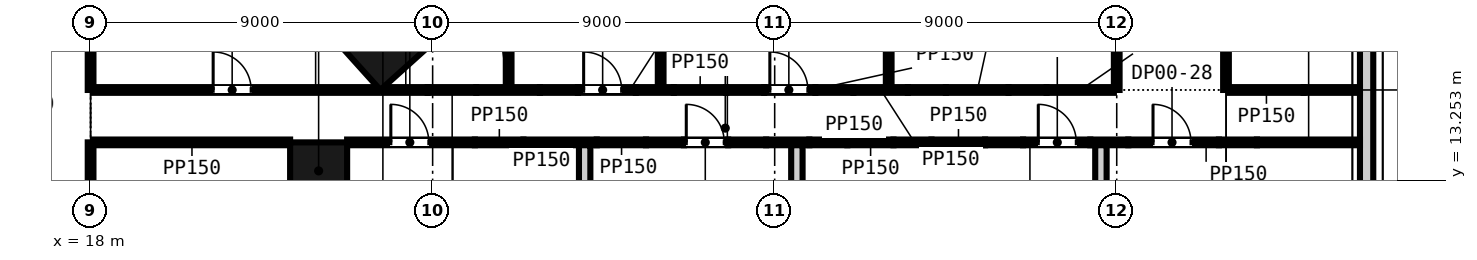
"""IFC4 building model, lengths in metres.
Left out: names, types, materials, properties, quantities, classifications, styles, units other than length and angle.
Written with IfcOpenShell. Run it as: python <this file> out.ifc"""

import sys

from ifc_helpers import new_model, si_unit, direction, frame, frame_2d, origin, origin_2d, place, context, subcontext, project, spatial, rectangle, extrude, element, fill, save


model = new_model("IFC4")
c1 = context("Model", 3, precision=1e-05, world=origin(), true_north=direction((0.0, 1.0)))
c2 = subcontext(c1, "Body", "Model", "MODEL_VIEW")
j1 = project(units=[si_unit("LENGTHUNIT", "METRE"), si_unit("PLANEANGLEUNIT", "RADIAN")], contexts=[c1])
p1 = place(None, origin())
s1 = spatial("IfcSite", under=j1, at=p1, CompositionType="ELEMENT")
p2 = place(p1, origin())
s2 = spatial("IfcBuilding", under=s1, at=p2, CompositionType="ELEMENT")
p3 = place(p2, origin())
s3 = spatial("IfcBuildingStorey", under=s2, at=p3, CompositionType="ELEMENT", Elevation=0.0)
p4 = place(p3, frame((25.691, 16.9, -0.3), z_axis=(0.0, 0.0, 1.0), x_axis=(-0.669130606359, 0.743144825477, 0.0)))
e1 = element("IfcColumn", 1, at=p4, inside=s3, PredefinedType="COLUMN", context=c2, shape_type="SweptSolid", body=[
    extrude(rectangle(XDim=1.8, YDim=1.8, at=origin_2d()), origin(), (0.0, 0.0, 1.0), 8.9),
])
p5 = place(p3, frame((24.0, 13.5, -0.3), z_axis=(0.0, 0.0, 1.0), x_axis=(1.0, 0.0, 0.0)))
e2 = element("IfcColumn", 2, at=p5, inside=s3, PredefinedType="COLUMN", context=c2, shape_type="SweptSolid", body=[
    extrude(rectangle(XDim=1.5, YDim=1.5, at=origin_2d()), origin(), (0.0, 0.0, 1.0), 8.9),
])
p6 = place(p3, frame((51.575, 9.25, -0.3), z_axis=(0.0, 0.0, 1.0), x_axis=(0.0, 1.0, 0.0)))
e3 = element("IfcWall", 3, at=p6, inside=s3, PredefinedType="SOLIDWALL", context=c2, shape_type="SweptSolid", body=[
    extrude(rectangle(XDim=7.75, YDim=0.35, at=frame_2d((3.875, 0.0))), origin(), (0.0, 0.0, 1.0), 8.0),
])
p7 = place(p3, frame((18.075, 14.25, 0.0), z_axis=(0.0, 0.0, 1.0), x_axis=(1.0, 0.0, 0.0)))
e4 = element("IfcWall", 4, at=p7, inside=s3, PredefinedType="PARTITIONING", context=c2, shape_type="SweptSolid", body=[
    extrude(rectangle(XDim=5.175, YDim=0.15, at=frame_2d((2.587, 0.0))), origin(), (0.0, 0.0, 1.0), 8.6),
])
p8 = place(p3, frame((24.75, 14.25, 0.0), z_axis=(0.0, 0.0, 1.0), x_axis=(1.0, 0.0, 0.0)))
e5 = element("IfcWall", 5, at=p8, inside=s3, PredefinedType="PARTITIONING", context=c2, shape_type="SweptSolid", body=[
    extrude(rectangle(XDim=3.361, YDim=0.15, at=frame_2d((1.681, 0.0))), origin(), (0.0, 0.0, 1.0), 8.6),
])
p9 = place(p8, frame((1.15, 0.0, 0.0)))
e6 = element("IfcOpeningElement", 6, at=p9, cuts=e5, PredefinedType="OPENING", context=c2, shape_type="SweptSolid", body=[
    extrude(rectangle(XDim=1.0, YDim=2.1, at=frame_2d((0.5, 1.05))), frame((0.0, 0.085, 0.0), z_axis=(0.0, -1.0, 0.0), x_axis=(1.0, 0.0, 0.0)), (0.0, 0.0, 1.0), 0.17),
])
p10 = place(p3, frame((28.111, 14.25, 0.0), z_axis=(0.0, 0.0, 1.0), x_axis=(1.0, 0.0, 0.0)))
e7 = element("IfcWall", 7, at=p10, inside=s3, PredefinedType="PARTITIONING", context=c2, shape_type="SweptSolid", body=[
    extrude(rectangle(XDim=1.278, YDim=0.15, at=frame_2d((0.639, 0.0))), origin(), (0.0, 0.0, 1.0), 7.6),
])
p11 = place(p3, frame((29.389, 14.25, 0.0), z_axis=(0.0, 0.0, 1.0), x_axis=(1.0, 0.0, 0.0)))
e8 = element("IfcWall", 8, at=p11, inside=s3, PredefinedType="PARTITIONING", context=c2, shape_type="SweptSolid", body=[
    extrude(rectangle(XDim=1.929, YDim=0.15, at=frame_2d((0.965, 0.0))), origin(), (0.0, 0.0, 1.0), 7.511),
])
p12 = place(p3, frame((31.319, 14.25, 0.0), z_axis=(0.0, 0.0, 1.0), x_axis=(1.0, 0.0, 0.0)))
e9 = element("IfcWall", 9, at=p12, inside=s3, PredefinedType="PARTITIONING", context=c2, shape_type="SweptSolid", body=[
    extrude(rectangle(XDim=1.295, YDim=0.15, at=frame_2d((0.648, 0.0))), origin(), (0.0, 0.0, 1.0), 8.6),
])
p13 = place(p3, frame((32.614, 14.25, 0.0), z_axis=(0.0, 0.0, 1.0), x_axis=(1.0, 0.0, 0.0)))
e10 = element("IfcWall", 10, at=p13, inside=s3, PredefinedType="PARTITIONING", context=c2, shape_type="SweptSolid", body=[
    extrude(rectangle(XDim=1.0, YDim=0.15, at=frame_2d((0.5, 0.0))), origin(), (0.0, 0.0, 1.0), 7.511),
])
p14 = place(p3, frame((33.614, 14.25, 0.0), z_axis=(0.0, 0.0, 1.0), x_axis=(1.0, 0.0, 0.0)))
e11 = element("IfcWall", 11, at=p14, inside=s3, PredefinedType="PARTITIONING", context=c2, shape_type="SweptSolid", body=[
    extrude(rectangle(XDim=1.162, YDim=0.15, at=frame_2d((0.581, 0.0))), origin(), (0.0, 0.0, 1.0), 8.6),
])
p15 = place(p14, frame((0.06, 0.0, 0.0)))
e12 = element("IfcOpeningElement", 12, at=p15, cuts=e11, PredefinedType="OPENING", context=c2, shape_type="SweptSolid", body=[
    extrude(rectangle(XDim=1.0, YDim=2.1, at=frame_2d((0.5, 1.05))), frame((0.0, 0.085, 0.0), z_axis=(0.0, -1.0, 0.0), x_axis=(1.0, 0.0, 0.0)), (0.0, 0.0, 1.0), 0.17),
])
p16 = place(p3, frame((34.776, 14.25, 0.0), z_axis=(0.0, 0.0, 1.0), x_axis=(1.0, 0.0, 0.0)))
e13 = element("IfcWall", 13, at=p16, inside=s3, PredefinedType="PARTITIONING", context=c2, shape_type="SweptSolid", body=[
    extrude(rectangle(XDim=1.0, YDim=0.15, at=frame_2d((0.5, 0.0))), origin(), (0.0, 0.0, 1.0), 7.511),
])
p17 = place(p3, frame((35.776, 14.25, 0.0), z_axis=(0.0, 0.0, 1.0), x_axis=(1.0, 0.0, 0.0)))
e14 = element("IfcWall", 14, at=p17, inside=s3, PredefinedType="PARTITIONING", context=c2, shape_type="SweptSolid", body=[
    extrude(rectangle(XDim=1.136, YDim=0.15, at=frame_2d((0.568, 0.0))), origin(), (0.0, 0.0, 1.0), 8.6),
])
p18 = place(p3, frame((36.912, 14.25, 0.0), z_axis=(0.0, 0.0, 1.0), x_axis=(1.0, 0.0, 0.0)))
e15 = element("IfcWall", 15, at=p18, inside=s3, PredefinedType="PARTITIONING", context=c2, shape_type="SweptSolid", body=[
    extrude(rectangle(XDim=1.0, YDim=0.15, at=frame_2d((0.5, 0.0))), origin(), (0.0, 0.0, 1.0), 7.511),
])
p19 = place(p3, frame((37.912, 14.25, 0.0), z_axis=(0.0, 0.0, 1.0), x_axis=(1.0, 0.0, 0.0)))
e16 = element("IfcWall", 16, at=p19, inside=s3, PredefinedType="PARTITIONING", context=c2, shape_type="SweptSolid", body=[
    extrude(rectangle(XDim=1.214, YDim=0.15, at=frame_2d((0.607, 0.0))), origin(), (0.0, 0.0, 1.0), 8.6),
])
p20 = place(p3, frame((39.126, 14.25, 0.0), z_axis=(0.0, 0.0, 1.0), x_axis=(1.0, 0.0, 0.0)))
e17 = element("IfcWall", 17, at=p20, inside=s3, PredefinedType="PARTITIONING", context=c2, shape_type="SweptSolid", body=[
    extrude(rectangle(XDim=1.0, YDim=0.15, at=frame_2d((0.5, 0.0))), origin(), (0.0, 0.0, 1.0), 7.511),
])
p21 = place(p3, frame((40.126, 14.25, 0.0), z_axis=(0.0, 0.0, 1.0), x_axis=(1.0, 0.0, 0.0)))
e18 = element("IfcWall", 18, at=p21, inside=s3, PredefinedType="PARTITIONING", context=c2, shape_type="SweptSolid", body=[
    extrude(rectangle(XDim=1.41, YDim=0.15, at=frame_2d((0.705, 0.0))), origin(), (0.0, 0.0, 1.0), 8.6),
])
p22 = place(p3, frame((41.536, 14.25, 0.0), z_axis=(0.0, 0.0, 1.0), x_axis=(1.0, 0.0, 0.0)))
e19 = element("IfcWall", 19, at=p22, inside=s3, PredefinedType="PARTITIONING", context=c2, shape_type="SweptSolid", body=[
    extrude(rectangle(XDim=1.0, YDim=0.15, at=frame_2d((0.5, 0.0))), origin(), (0.0, 0.0, 1.0), 7.511),
])
p23 = place(p3, frame((42.536, 14.25, 0.0), z_axis=(0.0, 0.0, 1.0), x_axis=(1.0, 0.0, 0.0)))
e20 = element("IfcWall", 20, at=p23, inside=s3, PredefinedType="PARTITIONING", context=c2, shape_type="SweptSolid", body=[
    extrude(rectangle(XDim=1.769, YDim=0.15, at=frame_2d((0.884, 0.0))), origin(), (0.0, 0.0, 1.0), 8.6),
])
p24 = place(p23, frame((0.4, 0.0, 0.0)))
e21 = element("IfcOpeningElement", 21, at=p24, cuts=e20, PredefinedType="OPENING", context=c2, shape_type="SweptSolid", body=[
    extrude(rectangle(XDim=1.0, YDim=2.1, at=frame_2d((0.5, 1.05))), frame((0.0, 0.085, 0.0), z_axis=(0.0, -1.0, 0.0), x_axis=(1.0, 0.0, 0.0)), (0.0, 0.0, 1.0), 0.17),
])
p25 = place(p3, frame((44.305, 14.25, 0.0), z_axis=(0.0, 0.0, 1.0), x_axis=(1.0, 0.0, 0.0)))
e22 = element("IfcWall", 22, at=p25, inside=s3, PredefinedType="PARTITIONING", context=c2, shape_type="SweptSolid", body=[
    extrude(rectangle(XDim=1.0, YDim=0.15, at=frame_2d((0.5, 0.0))), origin(), (0.0, 0.0, 1.0), 7.511),
])
p26 = place(p3, frame((45.305, 14.25, 0.0), z_axis=(0.0, 0.0, 1.0), x_axis=(1.0, 0.0, 0.0)))
e23 = element("IfcWall", 23, at=p26, inside=s3, PredefinedType="PARTITIONING", context=c2, shape_type="SweptSolid", body=[
    extrude(rectangle(XDim=2.384, YDim=0.15, at=frame_2d((1.192, 0.0))), origin(), (0.0, 0.0, 1.0), 8.6),
])
p27 = place(p26, frame((0.65, 0.0, 0.0)))
e24 = element("IfcOpeningElement", 24, at=p27, cuts=e23, PredefinedType="OPENING", context=c2, shape_type="SweptSolid", body=[
    extrude(rectangle(XDim=1.0, YDim=2.1, at=frame_2d((0.5, 1.05))), frame((0.0, 0.085, 0.0), z_axis=(0.0, -1.0, 0.0), x_axis=(1.0, 0.0, 0.0)), (0.0, 0.0, 1.0), 0.17),
])
p28 = place(p3, frame((47.689, 14.25, 0.0), z_axis=(0.0, 0.0, 1.0), x_axis=(1.0, 0.0, 0.0)))
e25 = element("IfcWall", 25, at=p28, inside=s3, PredefinedType="PARTITIONING", context=c2, shape_type="SweptSolid", body=[
    extrude(rectangle(XDim=1.0, YDim=0.15, at=frame_2d((0.5, 0.0))), origin(), (0.0, 0.0, 1.0), 7.686),
])
p29 = place(p3, frame((48.689, 14.25, 0.0), z_axis=(0.0, 0.0, 1.0), x_axis=(1.0, 0.0, 0.0)))
e26 = element("IfcWall", 26, at=p29, inside=s3, PredefinedType="PARTITIONING", context=c2, shape_type="SweptSolid", body=[
    extrude(rectangle(XDim=2.711, YDim=0.15, at=frame_2d((1.355, 0.0))), origin(), (0.0, 0.0, 1.0), 8.6),
])
p30 = place(p3, frame((18.075, 15.629, 0.0), z_axis=(0.0, 0.0, 1.0), x_axis=(1.0, 0.0, 0.0)))
e27 = element("IfcWall", 27, at=p30, inside=s3, PredefinedType="PARTITIONING", context=c2, shape_type="SweptSolid", body=[
    extrude(rectangle(XDim=7.482, YDim=0.15, at=frame_2d((3.741, 0.0))), origin(), (0.0, 0.0, 1.0), 8.6),
])
p31 = place(p30, frame((3.15, 0.0, 0.0)))
e28 = element("IfcOpeningElement", 28, at=p31, cuts=e27, PredefinedType="OPENING", context=c2, shape_type="SweptSolid", body=[
    extrude(rectangle(XDim=1.0, YDim=2.1, at=frame_2d((0.5, 1.05))), frame((0.0, 0.085, 0.0), z_axis=(0.0, -1.0, 0.0), x_axis=(1.0, 0.0, 0.0)), (0.0, 0.0, 1.0), 0.17),
])
p32 = place(p3, frame((25.708, 15.629, 0.0), z_axis=(0.0, 0.0, 1.0), x_axis=(1.0, 0.0, 0.0)))
e29 = element("IfcWall", 29, at=p32, inside=s3, PredefinedType="PARTITIONING", context=c2, shape_type="SweptSolid", body=[
    extrude(rectangle(XDim=1.162, YDim=0.15, at=frame_2d((0.581, 0.0))), origin(), (0.0, 0.0, 1.0), 8.6),
])
p33 = place(p3, frame((26.869, 15.629, 0.0), z_axis=(0.0, 0.0, 1.0), x_axis=(1.0, 0.0, 0.0)))
e30 = element("IfcWall", 30, at=p33, inside=s3, PredefinedType="PARTITIONING", context=c2, shape_type="SweptSolid", body=[
    extrude(rectangle(XDim=1.278, YDim=0.15, at=frame_2d((0.639, 0.0))), origin(), (0.0, 0.0, 1.0), 7.6),
])
p34 = place(p3, frame((28.148, 15.629, 0.0), z_axis=(0.0, 0.0, 1.0), x_axis=(1.0, 0.0, 0.0)))
e31 = element("IfcWall", 31, at=p34, inside=s3, PredefinedType="PARTITIONING", context=c2, shape_type="SweptSolid", body=[
    extrude(rectangle(XDim=1.676, YDim=0.15, at=frame_2d((0.838, 0.0))), origin(), (0.0, 0.0, 1.0), 8.6),
])
p35 = place(p3, frame((29.823, 15.629, 0.0), z_axis=(0.0, 0.0, 1.0), x_axis=(1.0, 0.0, 0.0)))
e32 = element("IfcWall", 32, at=p35, inside=s3, PredefinedType="PARTITIONING", context=c2, shape_type="SweptSolid", body=[
    extrude(rectangle(XDim=1.0, YDim=0.15, at=frame_2d((0.5, 0.0))), origin(), (0.0, 0.0, 1.0), 7.511),
])
p36 = place(p3, frame((30.823, 15.629, 0.0), z_axis=(0.0, 0.0, 1.0), x_axis=(1.0, 0.0, 0.0)))
e33 = element("IfcWall", 33, at=p36, inside=s3, PredefinedType="PARTITIONING", context=c2, shape_type="SweptSolid", body=[
    extrude(rectangle(XDim=1.523, YDim=0.15, at=frame_2d((0.762, 0.0))), origin(), (0.0, 0.0, 1.0), 8.6),
])
p37 = place(p36, frame((0.15, 0.0, 0.0)))
e34 = element("IfcOpeningElement", 34, at=p37, cuts=e33, PredefinedType="OPENING", context=c2, shape_type="SweptSolid", body=[
    extrude(rectangle(XDim=1.0, YDim=2.1, at=frame_2d((0.5, 1.05))), frame((0.0, 0.085, 0.0), z_axis=(0.0, -1.0, 0.0), x_axis=(1.0, 0.0, 0.0)), (0.0, 0.0, 1.0), 0.17),
])
p38 = place(p3, frame((32.346, 15.629, 0.0), z_axis=(0.0, 0.0, 1.0), x_axis=(1.0, 0.0, 0.0)))
e35 = element("IfcWall", 35, at=p38, inside=s3, PredefinedType="PARTITIONING", context=c2, shape_type="SweptSolid", body=[
    extrude(rectangle(XDim=1.0, YDim=0.15, at=frame_2d((0.5, 0.0))), origin(), (0.0, 0.0, 1.0), 7.511),
])
p39 = place(p3, frame((33.346, 15.629, 0.0), z_axis=(0.0, 0.0, 1.0), x_axis=(1.0, 0.0, 0.0)))
e36 = element("IfcWall", 36, at=p39, inside=s3, PredefinedType="PARTITIONING", context=c2, shape_type="SweptSolid", body=[
    extrude(rectangle(XDim=1.376, YDim=0.15, at=frame_2d((0.688, 0.0))), origin(), (0.0, 0.0, 1.0), 8.6),
])
p40 = place(p3, frame((34.723, 15.629, 0.0), z_axis=(0.0, 0.0, 1.0), x_axis=(1.0, 0.0, 0.0)))
e37 = element("IfcWall", 37, at=p40, inside=s3, PredefinedType="PARTITIONING", context=c2, shape_type="SweptSolid", body=[
    extrude(rectangle(XDim=1.0, YDim=0.15, at=frame_2d((0.5, 0.0))), origin(), (0.0, 0.0, 1.0), 7.511),
])
p41 = place(p3, frame((35.723, 15.629, 0.0), z_axis=(0.0, 0.0, 1.0), x_axis=(1.0, 0.0, 0.0)))
e38 = element("IfcWall", 38, at=p41, inside=s3, PredefinedType="PARTITIONING", context=c2, shape_type="SweptSolid", body=[
    extrude(rectangle(XDim=1.348, YDim=0.15, at=frame_2d((0.674, 0.0))), origin(), (0.0, 0.0, 1.0), 8.6),
])
p42 = place(p41, frame((0.15, 0.0, 0.0)))
e39 = element("IfcOpeningElement", 39, at=p42, cuts=e38, PredefinedType="OPENING", context=c2, shape_type="SweptSolid", body=[
    extrude(rectangle(XDim=1.0, YDim=2.1, at=frame_2d((0.5, 1.05))), frame((0.0, 0.085, 0.0), z_axis=(0.0, -1.0, 0.0), x_axis=(1.0, 0.0, 0.0)), (0.0, 0.0, 1.0), 0.17),
])
p43 = place(p3, frame((37.071, 15.629, 0.0), z_axis=(0.0, 0.0, 1.0), x_axis=(1.0, 0.0, 0.0)))
e40 = element("IfcWall", 40, at=p43, inside=s3, PredefinedType="PARTITIONING", context=c2, shape_type="SweptSolid", body=[
    extrude(rectangle(XDim=1.0, YDim=0.15, at=frame_2d((0.5, 0.0))), origin(), (0.0, 0.0, 1.0), 7.511),
])
p44 = place(p3, frame((38.071, 15.629, 0.0), z_axis=(0.0, 0.0, 1.0), x_axis=(1.0, 0.0, 0.0)))
e41 = element("IfcWall", 41, at=p44, inside=s3, PredefinedType="PARTITIONING", context=c2, shape_type="SweptSolid", body=[
    extrude(rectangle(XDim=1.434, YDim=0.15, at=frame_2d((0.717, 0.0))), origin(), (0.0, 0.0, 1.0), 8.6),
])
p45 = place(p3, frame((39.505, 15.629, 0.0), z_axis=(0.0, 0.0, 1.0), x_axis=(1.0, 0.0, 0.0)))
e42 = element("IfcWall", 42, at=p45, inside=s3, PredefinedType="PARTITIONING", context=c2, shape_type="SweptSolid", body=[
    extrude(rectangle(XDim=1.0, YDim=0.15, at=frame_2d((0.5, 0.0))), origin(), (0.0, 0.0, 1.0), 7.511),
])
p46 = place(p3, frame((40.505, 15.629, 0.0), z_axis=(0.0, 0.0, 1.0), x_axis=(1.0, 0.0, 0.0)))
e43 = element("IfcWall", 43, at=p46, inside=s3, PredefinedType="PARTITIONING", context=c2, shape_type="SweptSolid", body=[
    extrude(rectangle(XDim=1.649, YDim=0.15, at=frame_2d((0.825, 0.0))), origin(), (0.0, 0.0, 1.0), 8.6),
])
p47 = place(p3, frame((42.154, 15.629, 0.0), z_axis=(0.0, 0.0, 1.0), x_axis=(1.0, 0.0, 0.0)))
e44 = element("IfcWall", 44, at=p47, inside=s3, PredefinedType="PARTITIONING", context=c2, shape_type="SweptSolid", body=[
    extrude(rectangle(XDim=1.0, YDim=0.15, at=frame_2d((0.5, 0.0))), origin(), (0.0, 0.0, 1.0), 7.511),
])
p48 = place(p3, frame((43.154, 15.629, 0.0), z_axis=(0.0, 0.0, 1.0), x_axis=(1.0, 0.0, 0.0)))
e45 = element("IfcWall", 45, at=p48, inside=s3, PredefinedType="PARTITIONING", context=c2, shape_type="SweptSolid", body=[
    extrude(rectangle(XDim=1.771, YDim=0.15, at=frame_2d((0.885, 0.0))), origin(), (0.0, 0.0, 1.0), 8.6),
])
p49 = place(p3, frame((47.95, 15.629, 0.0), z_axis=(0.0, 0.0, 1.0), x_axis=(1.0, 0.0, 0.0)))
e46 = element("IfcWall", 46, at=p49, inside=s3, PredefinedType="PARTITIONING", context=c2, shape_type="SweptSolid", body=[
    extrude(rectangle(XDim=1.968, YDim=0.15, at=frame_2d((0.984, 0.0))), origin(), (0.0, 0.0, 1.0), 7.686),
])
p50 = place(p3, frame((49.918, 15.629, 0.0), z_axis=(0.0, 0.0, 1.0), x_axis=(1.0, 0.0, 0.0)))
e47 = element("IfcWall", 47, at=p50, inside=s3, PredefinedType="PARTITIONING", context=c2, shape_type="SweptSolid", body=[
    extrude(rectangle(XDim=1.482, YDim=0.15, at=frame_2d((0.741, 0.0))), origin(), (0.0, 0.0, 1.0), 8.6),
])
p51 = place(p3, frame((18.0, 0.0, 0.0), z_axis=(0.0, 0.0, 1.0), x_axis=(0.0, 1.0, 0.0)))
e48 = element("IfcWall", 48, at=p51, inside=s3, PredefinedType="PARTITIONING", context=c2, shape_type="SweptSolid", body=[
    extrude(rectangle(XDim=14.25, YDim=0.15, at=frame_2d((7.125, 0.0))), origin(), (0.0, 0.0, 1.0), 8.6),
])
p52 = place(p51, frame((2.4, 0.0, 0.0)))
e49 = element("IfcOpeningElement", 49, at=p52, cuts=e48, PredefinedType="OPENING", context=c2, shape_type="SweptSolid", body=[
    extrude(rectangle(XDim=1.0, YDim=2.1, at=frame_2d((0.5, 1.05))), frame((0.0, 0.085, 0.0), z_axis=(0.0, -1.0, 0.0), x_axis=(1.0, 0.0, 0.0)), (0.0, 0.0, 1.0), 0.17),
])
p53 = place(p3, frame((18.0, 15.629, 0.0), z_axis=(0.0, 0.0, 1.0), x_axis=(0.0, 1.0, 0.0)))
e50 = element("IfcWall", 50, at=p53, inside=s3, PredefinedType="PARTITIONING", context=c2, shape_type="SweptSolid", body=[
    extrude(rectangle(XDim=2.371, YDim=0.15, at=frame_2d((1.185, 0.0))), origin(), (0.0, 0.0, 1.0), 8.6),
])
p54 = place(p3, frame((29.0, 15.704, 0.0), z_axis=(0.0, 0.0, 1.0), x_axis=(0.0, 1.0, 0.0)))
e51 = element("IfcWall", 51, at=p54, inside=s3, PredefinedType="PARTITIONING", context=c2, shape_type="SweptSolid", body=[
    extrude(rectangle(XDim=2.796, YDim=0.15, at=frame_2d((1.398, 0.0))), origin(), (0.0, 0.0, 1.0), 8.6),
])
p55 = place(p3, frame((31.0, 11.469, 0.0), z_axis=(0.0, 0.0, 1.0), x_axis=(0.0, 1.0, 0.0)))
e52 = element("IfcWall", 52, at=p55, inside=s3, PredefinedType="PARTITIONING", context=c2, shape_type="SweptSolid", body=[
    extrude(rectangle(XDim=2.707, YDim=0.3, at=frame_2d((1.353, 0.0))), origin(), (0.0, 0.0, 1.0), 7.511),
])
p56 = place(p3, frame((33.0, 15.704, 0.0), z_axis=(0.0, 0.0, 1.0), x_axis=(0.0, 1.0, 0.0)))
e53 = element("IfcWall", 53, at=p56, inside=s3, PredefinedType="PARTITIONING", context=c2, shape_type="SweptSolid", body=[
    extrude(rectangle(XDim=1.0, YDim=0.15, at=frame_2d((0.5, 0.0))), origin(), (0.0, 0.0, 1.0), 7.511),
])
p57 = place(p3, frame((36.584, 10.129, 0.0), z_axis=(0.0, 0.0, 1.0), x_axis=(0.0, 1.0, 0.0)))
e54 = element("IfcWall", 54, at=p57, inside=s3, PredefinedType="PARTITIONING", context=c2, shape_type="SweptSolid", body=[
    extrude(rectangle(XDim=4.046, YDim=0.3, at=frame_2d((2.023, 0.0))), origin(), (0.0, 0.0, 1.0), 8.6),
])
p58 = place(p3, frame((39.0, 15.704, 0.0), z_axis=(0.0, 0.0, 1.0), x_axis=(0.0, 1.0, 0.0)))
e55 = element("IfcWall", 55, at=p58, inside=s3, PredefinedType="PARTITIONING", context=c2, shape_type="SweptSolid", body=[
    extrude(rectangle(XDim=9.903, YDim=0.15, at=frame_2d((4.952, 0.0))), origin(), (0.0, 0.0, 1.0), 8.6),
])
p59 = place(p3, frame((44.584, 13.175, 0.0), z_axis=(0.0, 0.0, 1.0), x_axis=(0.0, 1.0, 0.0)))
e56 = element("IfcWall", 56, at=p59, inside=s3, PredefinedType="PARTITIONING", context=c2, shape_type="SweptSolid", body=[
    extrude(rectangle(XDim=1.0, YDim=0.3, at=frame_2d((0.5, 0.0))), origin(), (0.0, 0.0, 1.0), 7.511),
])
p60 = place(p3, frame((45.0, 15.629, 0.0), z_axis=(0.0, 0.0, 1.0), x_axis=(0.0, 1.0, 0.0)))
e57 = element("IfcWall", 57, at=p60, inside=s3, PredefinedType="PARTITIONING", context=c2, shape_type="SweptSolid", body=[
    extrude(rectangle(XDim=4.56, YDim=0.15, at=frame_2d((2.28, 0.0))), origin(), (0.0, 0.0, 1.0), 8.6),
])
p61 = place(p3, frame((47.875, 15.629, 0.0), z_axis=(0.0, 0.0, 1.0), x_axis=(0.0, 1.0, 0.0)))
e58 = element("IfcWall", 58, at=p61, inside=s3, PredefinedType="PARTITIONING", context=c2, shape_type="SweptSolid", body=[
    extrude(rectangle(XDim=2.855, YDim=0.15, at=frame_2d((1.428, 0.0))), origin(), (0.0, 0.0, 1.0), 8.6),
])
p62 = place(p9, origin())
e59 = element("IfcDoor", 59, at=p62, inside=s3, OperationType="SINGLE_SWING_LEFT", PredefinedType="DOOR", context=c2, shape_type="SweptSolid", body=[
    extrude(rectangle(XDim=1.0, YDim=2.1, at=frame_2d((0.5, 1.05))), frame((0.0, 0.025, 0.0), z_axis=(0.0, -1.0, 0.0), x_axis=(1.0, 0.0, 0.0)), (0.0, 0.0, 1.0), 0.05),
])
fill(e6, e59)
p63 = place(p15, origin())
e60 = element("IfcDoor", 60, at=p63, inside=s3, OperationType="SINGLE_SWING_LEFT", PredefinedType="DOOR", context=c2, shape_type="SweptSolid", body=[
    extrude(rectangle(XDim=1.0, YDim=2.1, at=frame_2d((0.5, 1.05))), frame((0.0, 0.025, 0.0), z_axis=(0.0, -1.0, 0.0), x_axis=(1.0, 0.0, 0.0)), (0.0, 0.0, 1.0), 0.05),
])
fill(e12, e60)
p64 = place(p24, origin())
e61 = element("IfcDoor", 61, at=p64, inside=s3, OperationType="SINGLE_SWING_LEFT", PredefinedType="DOOR", context=c2, shape_type="SweptSolid", body=[
    extrude(rectangle(XDim=1.0, YDim=2.1, at=frame_2d((0.5, 1.05))), frame((0.0, 0.025, 0.0), z_axis=(0.0, -1.0, 0.0), x_axis=(1.0, 0.0, 0.0)), (0.0, 0.0, 1.0), 0.05),
])
fill(e21, e61)
p65 = place(p27, origin())
e62 = element("IfcDoor", 62, at=p65, inside=s3, OperationType="SINGLE_SWING_LEFT", PredefinedType="DOOR", context=c2, shape_type="SweptSolid", body=[
    extrude(rectangle(XDim=1.0, YDim=2.1, at=frame_2d((0.5, 1.05))), frame((0.0, 0.025, 0.0), z_axis=(0.0, -1.0, 0.0), x_axis=(1.0, 0.0, 0.0)), (0.0, 0.0, 1.0), 0.05),
])
fill(e24, e62)
p66 = place(p31, origin())
e63 = element("IfcDoor", 63, at=p66, inside=s3, OperationType="SINGLE_SWING_LEFT", PredefinedType="DOOR", context=c2, shape_type="SweptSolid", body=[
    extrude(rectangle(XDim=1.0, YDim=2.1, at=frame_2d((0.5, 1.05))), frame((0.0, 0.025, 0.0), z_axis=(0.0, -1.0, 0.0), x_axis=(1.0, 0.0, 0.0)), (0.0, 0.0, 1.0), 0.05),
])
fill(e28, e63)
p67 = place(p37, origin())
e64 = element("IfcDoor", 64, at=p67, inside=s3, OperationType="SINGLE_SWING_LEFT", PredefinedType="DOOR", context=c2, shape_type="SweptSolid", body=[
    extrude(rectangle(XDim=1.0, YDim=2.1, at=frame_2d((0.5, 1.05))), frame((0.0, 0.025, 0.0), z_axis=(0.0, -1.0, 0.0), x_axis=(1.0, 0.0, 0.0)), (0.0, 0.0, 1.0), 0.05),
])
fill(e34, e64)
p68 = place(p42, origin())
e65 = element("IfcDoor", 65, at=p68, inside=s3, OperationType="SINGLE_SWING_LEFT", PredefinedType="DOOR", context=c2, shape_type="SweptSolid", body=[
    extrude(rectangle(XDim=1.0, YDim=2.1, at=frame_2d((0.5, 1.05))), frame((0.0, 0.025, 0.0), z_axis=(0.0, -1.0, 0.0), x_axis=(1.0, 0.0, 0.0)), (0.0, 0.0, 1.0), 0.05),
])
fill(e39, e65)
save(model, sys.argv[1])
